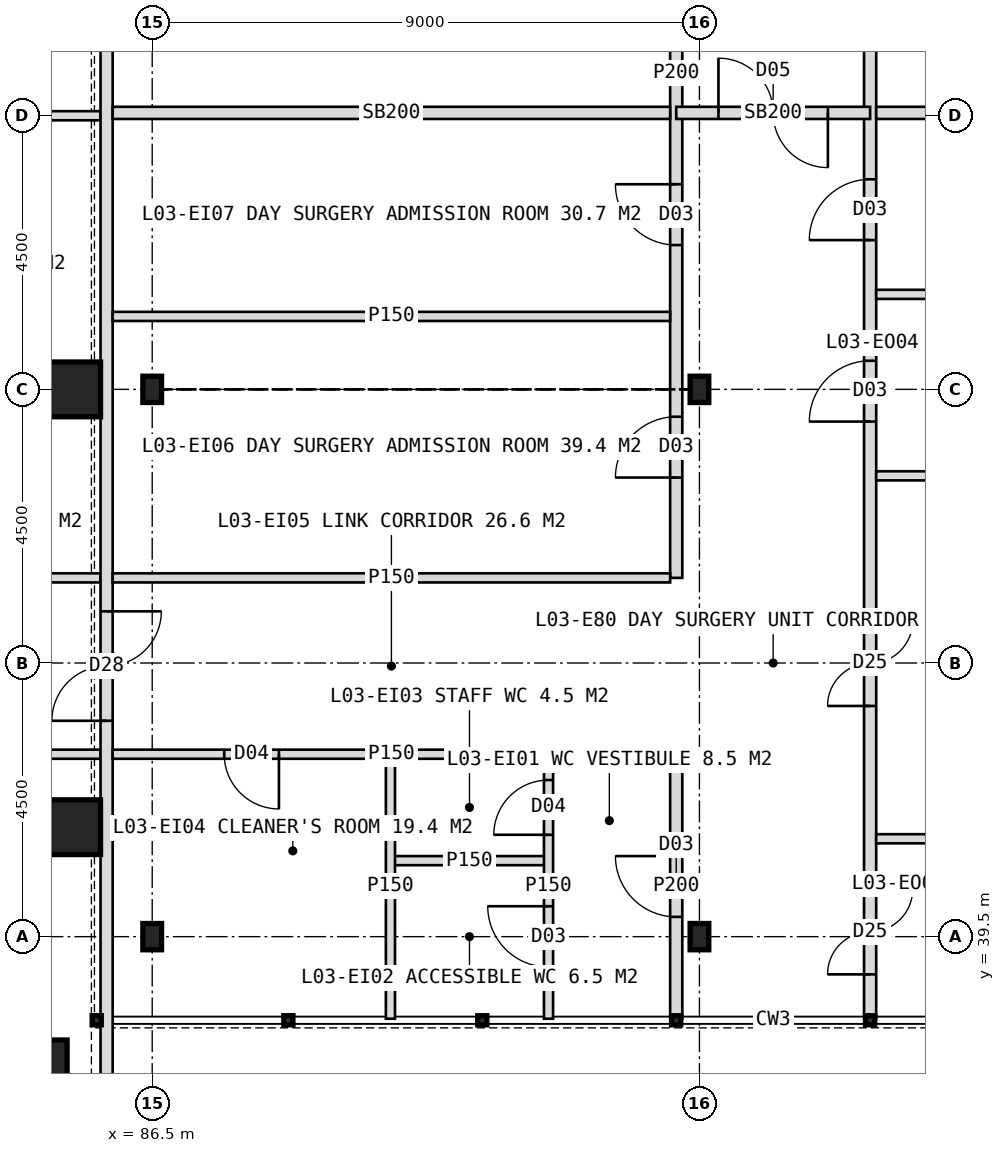
"""IFC4 building model, lengths in metres.
Left out: names, types, materials, properties, quantities, classifications, styles, units other than length and angle.
Written with IfcOpenShell. Run it as: python <this file> out.ifc"""

import sys

from ifc_helpers import new_model, si_unit, direction, frame, frame_2d, origin, origin_2d, place, context, subcontext, project, spatial, rectangle, hollow_rectangle, i_section, extrude, element, fill, save


model = new_model("IFC4")
c1 = context("Model", 3, precision=1e-05, world=origin(), true_north=direction((0.0, 1.0)))
c2 = subcontext(c1, "Body", "Model", "MODEL_VIEW")
j1 = project(units=[si_unit("LENGTHUNIT", "METRE"), si_unit("PLANEANGLEUNIT", "RADIAN")], contexts=[c1])
p1 = place(None, origin())
s1 = spatial("IfcSite", under=j1, at=p1, CompositionType="ELEMENT")
p2 = place(p1, origin())
s2 = spatial("IfcBuilding", under=s1, at=p2, CompositionType="ELEMENT")
p3 = place(p2, frame((0.0, 0.0, 16.5)))
s3 = spatial("IfcBuildingStorey", under=s2, at=p3, CompositionType="ELEMENT", Elevation=16.5)
for number, where, z_axis, x_axis in (
    (1, (85.2, 41.3, 0.0), (0.0, 0.0, 1.0), (1.0, 0.0, 0.0)),
    (2, (85.2, 48.5, 0.0), (0.0, 0.0, 1.0), (1.0, 0.0, 0.0)),
    (3, (84.65, 37.35, 0.0), (0.0, 0.0, 1.0), (1.0, 0.0, 0.0)),
):
    element("IfcColumn", number, at=place(p3, frame(where, z_axis=z_axis, x_axis=x_axis)), inside=s3, PredefinedType="COLUMN", context=c2, shape_type="SweptSolid", body=[
        extrude(hollow_rectangle(XDim=0.9, YDim=0.9, WallThickness=0.08, at=origin_2d()), origin(), (0.0, 0.0, 1.0), 4.5),
    ])
for number, where, z_axis, x_axis in (
    (4, (86.5, 39.5, 0.0), (0.0, 0.0, 1.0), (1.0, 0.0, 0.0)),
    (5, (86.5, 48.5, 0.0), (0.0, 0.0, 1.0), (1.0, 0.0, 0.0)),
    (6, (95.5, 39.5, 0.0), (0.0, 0.0, 1.0), (1.0, 0.0, 0.0)),
    (7, (95.5, 48.5, 0.0), (0.0, 0.0, 1.0), (1.0, 0.0, 0.0)),
):
    element("IfcColumn", number, at=place(p3, frame(where, z_axis=z_axis, x_axis=x_axis)), inside=s3, PredefinedType="COLUMN", context=c2, shape_type="SweptSolid", body=[
        extrude(i_section(OverallWidth=0.307, OverallDepth=0.432, WebThickness=0.021, FlangeThickness=0.04, FilletRadius=0.027, at=origin_2d()), origin(), (0.0, 0.0, 1.0), 4.5),
    ])
for number, where, z_axis, x_axis in (
    (8, (79.5, 53.0, 0.0), (0.0, 0.0, 1.0), (1.0, 0.0, 0.0)),
    (9, (79.5, 45.4, 0.0), (0.0, 0.0, 1.0), (1.0, 0.0, 0.0)),
    (10, (79.5, 42.5, 0.0), (0.0, 0.0, 1.0), (1.0, 0.0, 0.0)),
):
    element("IfcWall", number, at=place(p3, frame(where, z_axis=z_axis, x_axis=x_axis)), inside=s3, PredefinedType="PARTITIONING", context=c2, shape_type="SweptSolid", body=[
        extrude(rectangle(XDim=6.15, YDim=0.15, at=frame_2d((3.075, 0.0))), origin(), (0.0, 0.0, 1.0), 4.2),
    ])
p4 = place(p3, frame((98.307, 38.15, 0.0), z_axis=(0.0, 0.0, 1.0), x_axis=(0.0, 1.0, 0.0)))
e11 = element("IfcWall", 11, at=p4, inside=s3, PredefinedType="PARTITIONING", context=c2, shape_type="SweptSolid", body=[
    extrude(rectangle(XDim=47.7, YDim=0.2, at=frame_2d((23.85, 0.0))), origin(), (0.0, 0.0, 1.0), 4.2),
])
p5 = place(p4, frame((45.7, 0.0, 0.0)))
e12 = element("IfcOpeningElement", 12, at=p5, cuts=e11, PredefinedType="OPENING", context=c2, shape_type="SweptSolid", body=[
    extrude(rectangle(XDim=1.2, YDim=2.1, at=frame_2d((0.6, 1.05))), frame((0.0, 0.11, 0.0), z_axis=(0.0, -1.0, 0.0), x_axis=(1.0, 0.0, 0.0)), (0.0, 0.0, 1.0), 0.22),
])
p6 = place(p4, frame((36.244, 0.0, 0.0)))
e13 = element("IfcOpeningElement", 13, at=p6, cuts=e11, PredefinedType="OPENING", context=c2, shape_type="SweptSolid", body=[
    extrude(rectangle(XDim=1.0, YDim=2.1, at=frame_2d((0.5, 1.05))), frame((0.0, 0.11, 0.0), z_axis=(0.0, -1.0, 0.0), x_axis=(1.0, 0.0, 0.0)), (0.0, 0.0, 1.0), 0.22),
])
p7 = place(p4, frame((0.73, 0.0, 0.0)))
e14 = element("IfcOpeningElement", 14, at=p7, cuts=e11, PredefinedType="OPENING", context=c2, shape_type="SweptSolid", body=[
    extrude(rectangle(XDim=1.4, YDim=2.2, at=frame_2d((0.7, 1.1))), frame((0.0, 0.11, 0.0), z_axis=(0.0, -1.0, 0.0), x_axis=(1.0, 0.0, 0.0)), (0.0, 0.0, 1.0), 0.22),
])
p8 = place(p4, frame((5.144, 0.0, 0.0)))
e15 = element("IfcOpeningElement", 15, at=p8, cuts=e11, PredefinedType="OPENING", context=c2, shape_type="SweptSolid", body=[
    extrude(rectangle(XDim=1.4, YDim=2.2, at=frame_2d((0.7, 1.1))), frame((0.0, 0.11, 0.0), z_axis=(0.0, -1.0, 0.0), x_axis=(1.0, 0.0, 0.0)), (0.0, 0.0, 1.0), 0.22),
])
p9 = place(p4, frame((9.82, 0.0, 0.0)))
e16 = element("IfcOpeningElement", 16, at=p9, cuts=e11, PredefinedType="OPENING", context=c2, shape_type="SweptSolid", body=[
    extrude(rectangle(XDim=1.0, YDim=2.1, at=frame_2d((0.5, 1.05))), frame((0.0, 0.11, 0.0), z_axis=(0.0, -1.0, 0.0), x_axis=(1.0, 0.0, 0.0)), (0.0, 0.0, 1.0), 0.22),
])
p10 = place(p4, frame((12.805, 0.0, 0.0)))
e17 = element("IfcOpeningElement", 17, at=p10, cuts=e11, PredefinedType="OPENING", context=c2, shape_type="SweptSolid", body=[
    extrude(rectangle(XDim=1.0, YDim=2.1, at=frame_2d((0.5, 1.05))), frame((0.0, 0.11, 0.0), z_axis=(0.0, -1.0, 0.0), x_axis=(1.0, 0.0, 0.0)), (0.0, 0.0, 1.0), 0.22),
])
p11 = place(p4, frame((18.473, 0.0, 0.0)))
e18 = element("IfcOpeningElement", 18, at=p11, cuts=e11, PredefinedType="OPENING", context=c2, shape_type="SweptSolid", body=[
    extrude(rectangle(XDim=1.6, YDim=2.2, at=frame_2d((0.8, 1.1))), frame((0.0, 0.11, 0.0), z_axis=(0.0, -1.0, 0.0), x_axis=(1.0, 0.0, 0.0)), (0.0, 0.0, 1.0), 0.22),
])
p12 = place(p4, frame((25.934, 0.0, 0.0)))
e19 = element("IfcOpeningElement", 19, at=p12, cuts=e11, PredefinedType="OPENING", context=c2, shape_type="SweptSolid", body=[
    extrude(rectangle(XDim=1.6, YDim=2.2, at=frame_2d((0.8, 1.1))), frame((0.0, 0.11, 0.0), z_axis=(0.0, -1.0, 0.0), x_axis=(1.0, 0.0, 0.0)), (0.0, 0.0, 1.0), 0.22),
])
p13 = place(p4, frame((31.903, 0.0, 0.0)))
e20 = element("IfcOpeningElement", 20, at=p13, cuts=e11, PredefinedType="OPENING", context=c2, shape_type="SweptSolid", body=[
    extrude(rectangle(XDim=1.6, YDim=2.2, at=frame_2d((0.8, 1.1))), frame((0.0, 0.11, 0.0), z_axis=(0.0, -1.0, 0.0), x_axis=(1.0, 0.0, 0.0)), (0.0, 0.0, 1.0), 0.22),
])
p14 = place(p3, frame((95.118, 38.15, 0.0), z_axis=(0.0, 0.0, 1.0), x_axis=(0.0, 1.0, 0.0)))
e21 = element("IfcWall", 21, at=p14, inside=s3, PredefinedType="PARTITIONING", context=c2, shape_type="SweptSolid", body=[
    extrude(rectangle(XDim=4.35, YDim=0.2, at=frame_2d((2.175, 0.0))), origin(), (0.0, 0.0, 1.0), 4.2),
])
p15 = place(p14, frame((1.675, 0.0, 0.0)))
e22 = element("IfcOpeningElement", 22, at=p15, cuts=e21, PredefinedType="OPENING", context=c2, shape_type="SweptSolid", body=[
    extrude(rectangle(XDim=1.0, YDim=2.1, at=frame_2d((0.5, 1.05))), frame((0.0, 0.11, 0.0), z_axis=(0.0, -1.0, 0.0), x_axis=(1.0, 0.0, 0.0)), (0.0, 0.0, 1.0), 0.22),
])
p16 = place(p3, frame((95.118, 45.4, 0.0), z_axis=(0.0, 0.0, 1.0), x_axis=(0.0, 1.0, 0.0)))
e23 = element("IfcWall", 23, at=p16, inside=s3, PredefinedType="PARTITIONING", context=c2, shape_type="SweptSolid", body=[
    extrude(rectangle(XDim=16.6, YDim=0.2, at=frame_2d((8.3, 0.0))), origin(), (0.0, 0.0, 1.0), 4.2),
])
p17 = place(p16, frame((1.65, 0.0, 0.0)))
e24 = element("IfcOpeningElement", 24, at=p17, cuts=e23, PredefinedType="OPENING", context=c2, shape_type="SweptSolid", body=[
    extrude(rectangle(XDim=1.0, YDim=2.1, at=frame_2d((0.5, 1.05))), frame((0.0, 0.11, 0.0), z_axis=(0.0, -1.0, 0.0), x_axis=(1.0, 0.0, 0.0)), (0.0, 0.0, 1.0), 0.22),
])
p18 = place(p16, frame((5.473, 0.0, 0.0)))
e25 = element("IfcOpeningElement", 25, at=p18, cuts=e23, PredefinedType="OPENING", context=c2, shape_type="SweptSolid", body=[
    extrude(rectangle(XDim=1.0, YDim=2.1, at=frame_2d((0.5, 1.05))), frame((0.0, 0.11, 0.0), z_axis=(0.0, -1.0, 0.0), x_axis=(1.0, 0.0, 0.0)), (0.0, 0.0, 1.0), 0.22),
])
p19 = place(p16, frame((9.723, 0.0, 0.0)))
e26 = element("IfcOpeningElement", 26, at=p19, cuts=e23, PredefinedType="OPENING", context=c2, shape_type="SweptSolid", body=[
    extrude(rectangle(XDim=1.0, YDim=2.1, at=frame_2d((0.5, 1.05))), frame((0.0, 0.11, 0.0), z_axis=(0.0, -1.0, 0.0), x_axis=(1.0, 0.0, 0.0)), (0.0, 0.0, 1.0), 0.22),
])
p20 = place(p16, frame((13.9, 0.0, 0.0)))
e27 = element("IfcOpeningElement", 27, at=p20, cuts=e23, PredefinedType="OPENING", context=c2, shape_type="SweptSolid", body=[
    extrude(rectangle(XDim=1.6, YDim=2.2, at=frame_2d((0.8, 1.1))), frame((0.0, 0.11, 0.0), z_axis=(0.0, -1.0, 0.0), x_axis=(1.0, 0.0, 0.0)), (0.0, 0.0, 1.0), 0.22),
])
p21 = place(p3, frame((98.307, 53.047, 0.0), z_axis=(0.0, 0.0, 1.0), x_axis=(-1.0, 0.0, 0.0)))
e28 = element("IfcWall", 28, at=p21, inside=s3, PredefinedType="SOLIDWALL", context=c2, shape_type="SweptSolid", body=[
    extrude(rectangle(XDim=3.189, YDim=0.2, at=frame_2d((1.594, 0.0))), origin(), (0.0, 0.0, 1.0), 4.2),
])
p22 = place(p21, frame((0.695, 0.0, 0.0)))
e29 = element("IfcOpeningElement", 29, at=p22, cuts=e28, PredefinedType="OPENING", context=c2, shape_type="SweptSolid", body=[
    extrude(rectangle(XDim=1.8, YDim=2.2, at=frame_2d((0.9, 1.1))), frame((0.0, 0.11, 0.0), z_axis=(0.0, -1.0, 0.0), x_axis=(1.0, 0.0, 0.0)), (0.0, 0.0, 1.0), 0.22),
])
p23 = place(p3, frame((85.75, 36.8, 0.0), z_axis=(0.0, 0.0, 1.0), x_axis=(0.0, 1.0, 0.0)))
e30 = element("IfcWall", 30, at=p23, inside=s3, PredefinedType="SOLIDWALL", context=c2, shape_type="SweptSolid", body=[
    extrude(rectangle(XDim=50.4, YDim=0.2, at=frame_2d((25.2, 0.0))), origin(), (0.0, 0.0, 1.0), 4.2),
])
p24 = place(p23, frame((6.25, 0.0, 0.0)))
e31 = element("IfcOpeningElement", 31, at=p24, cuts=e30, PredefinedType="OPENING", context=c2, shape_type="SweptSolid", body=[
    extrude(rectangle(XDim=1.8, YDim=2.2, at=frame_2d((0.9, 1.1))), frame((0.0, 0.11, 0.0), z_axis=(0.0, -1.0, 0.0), x_axis=(1.0, 0.0, 0.0)), (0.0, 0.0, 1.0), 0.22),
])
p25 = place(p23, frame((25.55, 0.0, 0.0)))
e32 = element("IfcOpeningElement", 32, at=p25, cuts=e30, PredefinedType="OPENING", context=c2, shape_type="SweptSolid", body=[
    extrude(rectangle(XDim=1.8, YDim=2.2, at=frame_2d((0.9, 1.1))), frame((0.0, 0.11, 0.0), z_axis=(0.0, -1.0, 0.0), x_axis=(1.0, 0.0, 0.0)), (0.0, 0.0, 1.0), 0.22),
])
p26 = place(p3, frame((107.85, 41.109, 0.0), z_axis=(0.0, 0.0, 1.0), x_axis=(-1.0, 0.0, 0.0)))
e33 = element("IfcWall", 33, at=p26, inside=s3, PredefinedType="PARTITIONING", context=c2, shape_type="SweptSolid", body=[
    extrude(rectangle(XDim=9.443, YDim=0.15, at=frame_2d((4.722, 0.0))), origin(), (0.0, 0.0, 1.0), 4.2),
])
p27 = place(p26, frame((5.993, 0.0, 0.0)))
e34 = element("IfcOpeningElement", 34, at=p27, cuts=e33, PredefinedType="OPENING", context=c2, shape_type="SweptSolid", body=[
    extrude(rectangle(XDim=1.4, YDim=2.2, at=frame_2d((0.7, 1.1))), frame((0.0, 0.085, 0.0), z_axis=(0.0, -1.0, 0.0), x_axis=(1.0, 0.0, 0.0)), (0.0, 0.0, 1.0), 0.17),
])
p28 = place(p26, frame((1.521, 0.0, 0.0)))
e35 = element("IfcOpeningElement", 35, at=p28, cuts=e33, PredefinedType="OPENING", context=c2, shape_type="SweptSolid", body=[
    extrude(rectangle(XDim=1.0, YDim=2.1, at=frame_2d((0.5, 1.05))), frame((0.0, 0.085, 0.0), z_axis=(0.0, -1.0, 0.0), x_axis=(1.0, 0.0, 0.0)), (0.0, 0.0, 1.0), 0.17),
])
p29 = place(p3, frame((107.85, 47.078, 0.0), z_axis=(0.0, 0.0, 1.0), x_axis=(-1.0, 0.0, 0.0)))
e36 = element("IfcWall", 36, at=p29, inside=s3, PredefinedType="PARTITIONING", context=c2, shape_type="SweptSolid", body=[
    extrude(rectangle(XDim=9.443, YDim=0.15, at=frame_2d((4.722, 0.0))), origin(), (0.0, 0.0, 1.0), 4.2),
])
p30 = place(p29, frame((7.193, 0.0, 0.0)))
e37 = element("IfcOpeningElement", 37, at=p30, cuts=e36, PredefinedType="OPENING", context=c2, shape_type="SweptSolid", body=[
    extrude(rectangle(XDim=1.0, YDim=2.1, at=frame_2d((0.5, 1.05))), frame((0.0, 0.085, 0.0), z_axis=(0.0, -1.0, 0.0), x_axis=(1.0, 0.0, 0.0)), (0.0, 0.0, 1.0), 0.17),
])
p31 = place(p29, frame((2.271, 0.0, 0.0)))
e38 = element("IfcOpeningElement", 38, at=p31, cuts=e36, PredefinedType="OPENING", context=c2, shape_type="SweptSolid", body=[
    extrude(rectangle(XDim=1.0, YDim=2.1, at=frame_2d((0.5, 1.05))), frame((0.0, 0.085, 0.0), z_axis=(0.0, -1.0, 0.0), x_axis=(1.0, 0.0, 0.0)), (0.0, 0.0, 1.0), 0.17),
])
p32 = place(p3, frame((107.85, 50.062, 0.0), z_axis=(0.0, 0.0, 1.0), x_axis=(-1.0, 0.0, 0.0)))
e39 = element("IfcWall", 39, at=p32, inside=s3, PredefinedType="PARTITIONING", context=c2, shape_type="SweptSolid", body=[
    extrude(rectangle(XDim=9.443, YDim=0.15, at=frame_2d((4.722, 0.0))), origin(), (0.0, 0.0, 1.0), 4.2),
])
p33 = place(p3, frame((107.85, 53.047, 0.0), z_axis=(0.0, 0.0, 1.0), x_axis=(-1.0, 0.0, 0.0)))
e40 = element("IfcWall", 40, at=p33, inside=s3, PredefinedType="SOLIDWALL", context=c2, shape_type="SweptSolid", body=[
    extrude(rectangle(XDim=9.443, YDim=0.2, at=frame_2d((4.722, 0.0))), origin(), (0.0, 0.0, 1.0), 4.2),
])
p34 = place(p3, frame((93.018, 40.75, 0.0), z_axis=(0.0, 0.0, 1.0), x_axis=(-1.0, 0.0, 0.0)))
e41 = element("IfcWall", 41, at=p34, inside=s3, PredefinedType="PARTITIONING", context=c2, shape_type="SweptSolid", body=[
    extrude(rectangle(XDim=2.6, YDim=0.15, at=frame_2d((1.3, 0.0))), origin(), (0.0, 0.0, 1.0), 4.2),
])
p35 = place(p3, frame((95.018, 42.5, 0.0), z_axis=(0.0, 0.0, 1.0), x_axis=(-1.0, 0.0, 0.0)))
e42 = element("IfcWall", 42, at=p35, inside=s3, PredefinedType="PARTITIONING", context=c2, shape_type="SweptSolid", body=[
    extrude(rectangle(XDim=9.168, YDim=0.15, at=frame_2d((4.584, 0.0))), origin(), (0.0, 0.0, 1.0), 4.2),
])
p36 = place(p35, frame((6.434, 0.0, 0.0)))
e43 = element("IfcOpeningElement", 43, at=p36, cuts=e42, PredefinedType="OPENING", context=c2, shape_type="SweptSolid", body=[
    extrude(rectangle(XDim=0.9, YDim=2.1, at=frame_2d((0.45, 1.05))), frame((0.0, 0.085, 0.0), z_axis=(0.0, -1.0, 0.0), x_axis=(1.0, 0.0, 0.0)), (0.0, 0.0, 1.0), 0.17),
])
for number, where, z_axis, x_axis in (
    (44, (95.018, 45.4, 0.0), (0.0, 0.0, 1.0), (-1.0, 0.0, 0.0)),
    (45, (95.018, 49.7, 0.0), (0.0, 0.0, 1.0), (-1.0, 0.0, 0.0)),
):
    element("IfcWall", number, at=place(p3, frame(where, z_axis=z_axis, x_axis=x_axis)), inside=s3, PredefinedType="PARTITIONING", context=c2, shape_type="SweptSolid", body=[
        extrude(rectangle(XDim=9.168, YDim=0.15, at=frame_2d((4.584, 0.0))), origin(), (0.0, 0.0, 1.0), 4.2),
    ])
p37 = place(p3, frame((95.018, 53.047, 0.0), z_axis=(0.0, 0.0, 1.0), x_axis=(-1.0, 0.0, 0.0)))
e46 = element("IfcWall", 46, at=p37, inside=s3, PredefinedType="SOLIDWALL", context=c2, shape_type="SweptSolid", body=[
    extrude(rectangle(XDim=9.168, YDim=0.2, at=frame_2d((4.584, 0.0))), origin(), (0.0, 0.0, 1.0), 4.2),
])
p38 = place(p3, frame((93.018, 38.15, 0.0), z_axis=(0.0, 0.0, 1.0), x_axis=(0.0, 1.0, 0.0)))
e47 = element("IfcWall", 47, at=p38, inside=s3, PredefinedType="PARTITIONING", context=c2, shape_type="SweptSolid", body=[
    extrude(rectangle(XDim=4.35, YDim=0.15, at=frame_2d((2.175, 0.0))), origin(), (0.0, 0.0, 1.0), 4.2),
])
p39 = place(p38, frame((0.85, 0.0, 0.0)))
e48 = element("IfcOpeningElement", 48, at=p39, cuts=e47, PredefinedType="OPENING", context=c2, shape_type="SweptSolid", body=[
    extrude(rectangle(XDim=1.0, YDim=2.1, at=frame_2d((0.5, 1.05))), frame((0.0, 0.085, 0.0), z_axis=(0.0, -1.0, 0.0), x_axis=(1.0, 0.0, 0.0)), (0.0, 0.0, 1.0), 0.17),
])
p40 = place(p38, frame((3.025, 0.0, 0.0)))
e49 = element("IfcOpeningElement", 49, at=p40, cuts=e47, PredefinedType="OPENING", context=c2, shape_type="SweptSolid", body=[
    extrude(rectangle(XDim=0.9, YDim=2.1, at=frame_2d((0.45, 1.05))), frame((0.0, 0.085, 0.0), z_axis=(0.0, -1.0, 0.0), x_axis=(1.0, 0.0, 0.0)), (0.0, 0.0, 1.0), 0.17),
])
p41 = place(p3, frame((90.418, 38.15, 0.0), z_axis=(0.0, 0.0, 1.0), x_axis=(0.0, 1.0, 0.0)))
e50 = element("IfcWall", 50, at=p41, inside=s3, PredefinedType="PARTITIONING", context=c2, shape_type="SweptSolid", body=[
    extrude(rectangle(XDim=4.35, YDim=0.15, at=frame_2d((2.175, 0.0))), origin(), (0.0, 0.0, 1.0), 4.2),
])
p42 = place(p22, origin())
e51 = element("IfcDoor", 51, at=p42, inside=s3, OperationType="DOUBLE_DOOR_DOUBLE_SWING", PredefinedType="DOOR", context=c2, shape_type="SweptSolid", body=[
    extrude(rectangle(XDim=1.8, YDim=2.2, at=frame_2d((0.9, 1.1))), frame((0.0, 0.025, 0.0), z_axis=(0.0, -1.0, 0.0), x_axis=(1.0, 0.0, 0.0)), (0.0, 0.0, 1.0), 0.05),
])
fill(e29, e51)
p43 = place(p24, origin())
e52 = element("IfcDoor", 52, at=p43, inside=s3, OperationType="DOUBLE_DOOR_SINGLE_SWING", PredefinedType="DOOR", context=c2, shape_type="SweptSolid", body=[
    extrude(rectangle(XDim=1.8, YDim=2.2, at=frame_2d((0.9, 1.1))), frame((0.0, 0.025, 0.0), z_axis=(0.0, -1.0, 0.0), x_axis=(1.0, 0.0, 0.0)), (0.0, 0.0, 1.0), 0.05),
])
fill(e31, e52)
p44 = place(p7, origin())
e53 = element("IfcDoor", 53, at=p44, inside=s3, OperationType="DOUBLE_DOOR_SINGLE_SWING", PredefinedType="DOOR", context=c2, shape_type="SweptSolid", body=[
    extrude(rectangle(XDim=1.4, YDim=2.2, at=frame_2d((0.7, 1.1))), frame((0.0, 0.025, 0.0), z_axis=(0.0, -1.0, 0.0), x_axis=(1.0, 0.0, 0.0)), (0.0, 0.0, 1.0), 0.05),
])
fill(e14, e53)
p45 = place(p8, origin())
e54 = element("IfcDoor", 54, at=p45, inside=s3, OperationType="DOUBLE_DOOR_SINGLE_SWING", PredefinedType="DOOR", context=c2, shape_type="SweptSolid", body=[
    extrude(rectangle(XDim=1.4, YDim=2.2, at=frame_2d((0.7, 1.1))), frame((0.0, 0.025, 0.0), z_axis=(0.0, -1.0, 0.0), x_axis=(1.0, 0.0, 0.0)), (0.0, 0.0, 1.0), 0.05),
])
fill(e15, e54)
p46 = place(p9, origin())
e55 = element("IfcDoor", 55, at=p46, inside=s3, OperationType="SINGLE_SWING_LEFT", PredefinedType="DOOR", context=c2, shape_type="SweptSolid", body=[
    extrude(rectangle(XDim=1.0, YDim=2.1, at=frame_2d((0.5, 1.05))), frame((0.0, 0.025, 0.0), z_axis=(0.0, -1.0, 0.0), x_axis=(1.0, 0.0, 0.0)), (0.0, 0.0, 1.0), 0.05),
])
fill(e16, e55)
p47 = place(p10, origin())
e56 = element("IfcDoor", 56, at=p47, inside=s3, OperationType="SINGLE_SWING_LEFT", PredefinedType="DOOR", context=c2, shape_type="SweptSolid", body=[
    extrude(rectangle(XDim=1.0, YDim=2.1, at=frame_2d((0.5, 1.05))), frame((0.0, 0.025, 0.0), z_axis=(0.0, -1.0, 0.0), x_axis=(1.0, 0.0, 0.0)), (0.0, 0.0, 1.0), 0.05),
])
fill(e17, e56)
p48 = place(p15, origin())
e57 = element("IfcDoor", 57, at=p48, inside=s3, OperationType="SINGLE_SWING_RIGHT", PredefinedType="DOOR", context=c2, shape_type="SweptSolid", body=[
    extrude(rectangle(XDim=1.0, YDim=2.1, at=frame_2d((0.5, 1.05))), frame((0.0, 0.025, 0.0), z_axis=(0.0, -1.0, 0.0), x_axis=(1.0, 0.0, 0.0)), (0.0, 0.0, 1.0), 0.05),
])
fill(e22, e57)
p49 = place(p39, origin())
e58 = element("IfcDoor", 58, at=p49, inside=s3, OperationType="SINGLE_SWING_RIGHT", PredefinedType="DOOR", context=c2, shape_type="SweptSolid", body=[
    extrude(rectangle(XDim=1.0, YDim=2.1, at=frame_2d((0.5, 1.05))), frame((0.0, 0.025, 0.0), z_axis=(0.0, -1.0, 0.0), x_axis=(1.0, 0.0, 0.0)), (0.0, 0.0, 1.0), 0.05),
])
fill(e48, e58)
p50 = place(p40, origin())
e59 = element("IfcDoor", 59, at=p50, inside=s3, OperationType="SINGLE_SWING_LEFT", PredefinedType="DOOR", context=c2, shape_type="SweptSolid", body=[
    extrude(rectangle(XDim=0.9, YDim=2.1, at=frame_2d((0.45, 1.05))), frame((0.0, 0.025, 0.0), z_axis=(0.0, -1.0, 0.0), x_axis=(1.0, 0.0, 0.0)), (0.0, 0.0, 1.0), 0.05),
])
fill(e49, e59)
p51 = place(p36, origin())
e60 = element("IfcDoor", 60, at=p51, inside=s3, OperationType="SINGLE_SWING_LEFT", PredefinedType="DOOR", context=c2, shape_type="SweptSolid", body=[
    extrude(rectangle(XDim=0.9, YDim=2.1, at=frame_2d((0.45, 1.05))), frame((0.0, 0.025, 0.0), z_axis=(0.0, -1.0, 0.0), x_axis=(1.0, 0.0, 0.0)), (0.0, 0.0, 1.0), 0.05),
])
fill(e43, e60)
p52 = place(p17, origin())
e61 = element("IfcDoor", 61, at=p52, inside=s3, OperationType="SINGLE_SWING_LEFT", PredefinedType="DOOR", context=c2, shape_type="SweptSolid", body=[
    extrude(rectangle(XDim=1.0, YDim=2.1, at=frame_2d((0.5, 1.05))), frame((0.0, 0.025, 0.0), z_axis=(0.0, -1.0, 0.0), x_axis=(1.0, 0.0, 0.0)), (0.0, 0.0, 1.0), 0.05),
])
fill(e24, e61)
p53 = place(p18, origin())
e62 = element("IfcDoor", 62, at=p53, inside=s3, OperationType="SINGLE_SWING_RIGHT", PredefinedType="DOOR", context=c2, shape_type="SweptSolid", body=[
    extrude(rectangle(XDim=1.0, YDim=2.1, at=frame_2d((0.5, 1.05))), frame((0.0, 0.025, 0.0), z_axis=(0.0, -1.0, 0.0), x_axis=(1.0, 0.0, 0.0)), (0.0, 0.0, 1.0), 0.05),
])
fill(e25, e62)
save(model, sys.argv[1])
